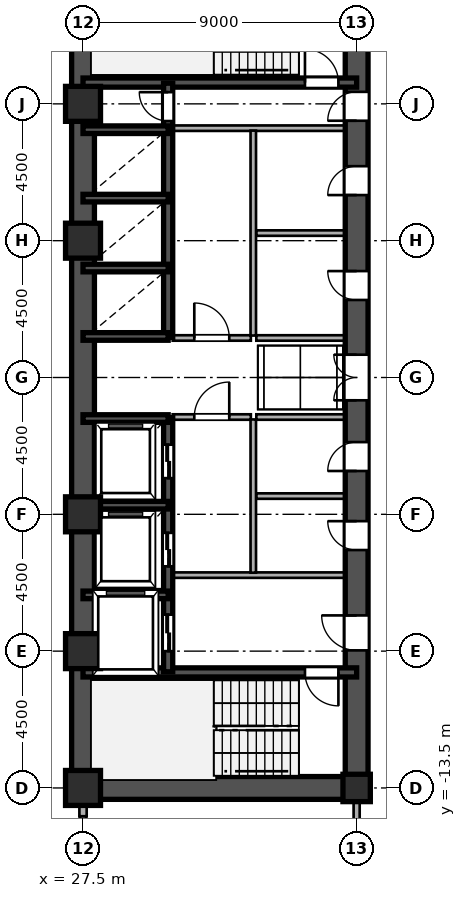
"""IFC4 building model, lengths in metres.
Left out: names, types, materials, properties, quantities, classifications, styles, units other than length and angle.
Written with IfcOpenShell. Run it as: python <this file> out.ifc"""

import sys

from ifc_helpers import new_model, si_unit, direction, frame, frame_2d, origin, origin_2d, place, context, subcontext, project, spatial, rectangle, hollow_rectangle, i_section, extrude, source, transform, mapped, element, fill, save


model = new_model("IFC4")
c1 = context("Model", 3, precision=1e-05, world=origin(), true_north=direction((0.0, 1.0)))
c2 = subcontext(c1, "Body", "Model", "MODEL_VIEW")
j1 = project(units=[si_unit("LENGTHUNIT", "METRE"), si_unit("PLANEANGLEUNIT", "RADIAN")], contexts=[c1])
p1 = place(None, origin())
s1 = spatial("IfcSite", under=j1, at=p1, CompositionType="ELEMENT")
p2 = place(p1, origin())
s2 = spatial("IfcBuilding", under=s1, at=p2, CompositionType="ELEMENT")
p3 = place(p2, frame((0.0, 0.0, 51.3)))
s3 = spatial("IfcBuildingStorey", under=s2, at=p3, CompositionType="ELEMENT", Elevation=51.3)
m1 = source(origin(), c2, "Body", "SweptSolid", [
    extrude(hollow_rectangle(XDim=1.15, YDim=1.15, WallThickness=0.048, at=origin_2d()), origin(), (0.0, 0.0, 1.0), 3.6),
])
for number, where, z_axis, x_axis in (
    (1, (27.5, -13.5, 0.0), (0.0, 0.0, 1.0), (1.0, 0.0, 0.0)),
    (2, (27.5, -9.0, 0.0), (0.0, 0.0, 1.0), (1.0, 0.0, 0.0)),
    (3, (27.5, -4.5, 0.0), (0.0, 0.0, 1.0), (1.0, 0.0, 0.0)),
    (4, (27.5, 4.5, 0.0), (0.0, 0.0, 1.0), (1.0, 0.0, 0.0)),
    (5, (27.5, 9.0, 0.0), (0.0, 0.0, 1.0), (1.0, 0.0, 0.0)),
):
    element("IfcColumn", number, at=place(p3, frame(where, z_axis=z_axis, x_axis=x_axis)), inside=s3, PredefinedType="COLUMN", context=c2, shape_type="MappedRepresentation", body=[
        mapped(m1, transform((0.0, 0.0, 0.0), scale=1.0)),
    ])
m2 = source(origin(), c2, "Body", "SweptSolid", [
    extrude(i_section(OverallWidth=0.9, OverallDepth=0.9, WebThickness=0.036, FlangeThickness=0.055, at=origin_2d()), origin(), (0.0, 0.0, 1.0), 3.6),
])
p4 = place(p3, frame((36.5, -13.5, 0.0), z_axis=(0.0, 0.0, 1.0), x_axis=(1.0, 0.0, 0.0)))
e6 = element("IfcColumn", 6, at=p4, inside=s3, PredefinedType="COLUMN", context=c2, shape_type="MappedRepresentation", body=[
    mapped(m2, transform((0.0, 0.0, 0.0), scale=1.0)),
])
p5 = place(p3, frame((27.5, -14.43, 0.0), z_axis=(0.0, 0.0, 1.0), x_axis=(0.0, 1.0, 0.0)))
e7 = element("IfcWall", 7, at=p5, inside=s3, PredefinedType="SOLIDWALL", context=c2, shape_type="SweptSolid", body=[
    extrude(rectangle(XDim=0.55, YDim=0.24, at=frame_2d((0.275, 0.0))), origin(), (0.0, 0.0, 1.0), 2.88),
])
for number, where, z_axis, x_axis in (
    (8, (27.5, -13.5, 0.0), (0.0, 0.0, 1.0), (0.0, 1.0, 0.0)),
    (9, (27.5, 1.3, 0.0), (0.0, 0.0, 1.0), (0.0, 1.0, 0.0)),
):
    element("IfcWall", number, at=place(p3, frame(where, z_axis=z_axis, x_axis=x_axis)), inside=s3, PredefinedType="SHEAR", context=c2, shape_type="SweptSolid", body=[
        extrude(rectangle(XDim=12.2, YDim=0.75, at=frame_2d((6.1, 0.0))), origin(), (0.0, 0.0, 1.0), 3.38),
    ])
p6 = place(p3, frame((27.5, -1.3, 0.0), z_axis=(0.0, 0.0, 1.0), x_axis=(0.0, 1.0, 0.0)))
e10 = element("IfcWall", 10, at=p6, inside=s3, PredefinedType="SHEAR", context=c2, shape_type="SweptSolid", body=[
    extrude(rectangle(XDim=2.6, YDim=0.75, at=frame_2d((1.3, 0.0))), origin(), (0.0, 0.0, 1.0), 3.38),
])
p7 = place(p3, frame((27.5, -13.5, 0.0), z_axis=(0.0, 0.0, 1.0), x_axis=(1.0, 0.0, 0.0)))
e11 = element("IfcWall", 11, at=p7, inside=s3, PredefinedType="SHEAR", context=c2, shape_type="SweptSolid", body=[
    extrude(rectangle(XDim=9.0, YDim=0.75, at=frame_2d((4.5, 0.0))), origin(), (0.0, 0.0, 1.0), 3.38),
])
p8 = place(p3, frame((36.5, -13.65, 0.0), z_axis=(0.0, 0.0, 1.0), x_axis=(0.0, 1.0, 0.0)))
e12 = element("IfcWall", 12, at=p8, inside=s3, PredefinedType="SHEAR", context=c2, shape_type="SweptSolid", body=[
    extrude(rectangle(XDim=7.15, YDim=0.75, at=frame_2d((3.575, 0.0))), origin(), (0.0, 0.0, 1.0), 3.38),
])
p9 = place(p8, frame((4.675, 0.0, 0.0)))
e13 = element("IfcOpeningElement", 13, at=p9, cuts=e12, PredefinedType="OPENING", context=c2, shape_type="SweptSolid", body=[
    extrude(rectangle(XDim=1.15, YDim=2.2, at=frame_2d((0.575, 1.1))), frame((0.0, 0.385, 0.0), z_axis=(0.0, -1.0, 0.0), x_axis=(1.0, 0.0, 0.0)), (0.0, 0.0, 1.0), 0.77),
])
p10 = place(p3, frame((36.5, -1.3, 0.0), z_axis=(0.0, 0.0, 1.0), x_axis=(0.0, 1.0, 0.0)))
e14 = element("IfcWall", 14, at=p10, inside=s3, PredefinedType="SHEAR", context=c2, shape_type="SweptSolid", body=[
    extrude(rectangle(XDim=2.6, YDim=0.75, at=frame_2d((1.3, 0.0))), origin(), (0.0, 0.0, 1.0), 3.38),
])
p11 = place(p10, frame((0.55, 0.0, 0.0)))
e15 = element("IfcOpeningElement", 15, at=p11, cuts=e14, PredefinedType="OPENING", context=c2, shape_type="SweptSolid", body=[
    extrude(rectangle(XDim=1.5, YDim=2.3, at=frame_2d((0.75, 1.15))), frame((0.0, 0.385, 0.0), z_axis=(0.0, -1.0, 0.0), x_axis=(1.0, 0.0, 0.0)), (0.0, 0.0, 1.0), 0.77),
])
p12 = place(p3, frame((36.5, 8.2, 0.0), z_axis=(0.0, 0.0, 1.0), x_axis=(0.0, 1.0, 0.0)))
e16 = element("IfcWall", 16, at=p12, inside=s3, PredefinedType="SHEAR", context=c2, shape_type="SweptSolid", body=[
    extrude(rectangle(XDim=5.45, YDim=0.75, at=frame_2d((2.725, 0.0))), origin(), (0.0, 0.0, 1.0), 3.38),
])
p13 = place(p12, frame((0.245, 0.0, 0.0)))
e17 = element("IfcOpeningElement", 17, at=p13, cuts=e16, PredefinedType="OPENING", context=c2, shape_type="SweptSolid", body=[
    extrude(rectangle(XDim=0.95, YDim=2.15, at=frame_2d((0.475, 1.075))), frame((0.0, 0.385, 0.0), z_axis=(0.0, -1.0, 0.0), x_axis=(1.0, 0.0, 0.0)), (0.0, 0.0, 1.0), 0.77),
])
p14 = place(p3, frame((36.5, -6.5, 0.0), z_axis=(0.0, 0.0, 1.0), x_axis=(0.0, 1.0, 0.0)))
e18 = element("IfcWall", 18, at=p14, inside=s3, PredefinedType="SHEAR", context=c2, shape_type="SweptSolid", body=[
    extrude(rectangle(XDim=2.6, YDim=0.75, at=frame_2d((1.3, 0.0))), origin(), (0.0, 0.0, 1.0), 3.38),
])
p15 = place(p14, frame((0.825, 0.0, 0.0)))
e19 = element("IfcOpeningElement", 19, at=p15, cuts=e18, PredefinedType="OPENING", context=c2, shape_type="SweptSolid", body=[
    extrude(rectangle(XDim=0.95, YDim=2.15, at=frame_2d((0.475, 1.075))), frame((0.0, 0.385, 0.0), z_axis=(0.0, -1.0, 0.0), x_axis=(1.0, 0.0, 0.0)), (0.0, 0.0, 1.0), 0.77),
])
p16 = place(p3, frame((36.5, -3.9, 0.0), z_axis=(0.0, 0.0, 1.0), x_axis=(0.0, 1.0, 0.0)))
e20 = element("IfcWall", 20, at=p16, inside=s3, PredefinedType="SHEAR", context=c2, shape_type="SweptSolid", body=[
    extrude(rectangle(XDim=2.6, YDim=0.75, at=frame_2d((1.3, 0.0))), origin(), (0.0, 0.0, 1.0), 3.38),
])
p17 = place(p16, frame((0.825, 0.0, 0.0)))
e21 = element("IfcOpeningElement", 21, at=p17, cuts=e20, PredefinedType="OPENING", context=c2, shape_type="SweptSolid", body=[
    extrude(rectangle(XDim=0.95, YDim=2.15, at=frame_2d((0.475, 1.075))), frame((0.0, 0.385, 0.0), z_axis=(0.0, -1.0, 0.0), x_axis=(1.0, 0.0, 0.0)), (0.0, 0.0, 1.0), 0.77),
])
p18 = place(p3, frame((36.5, 1.3, 0.0), z_axis=(0.0, 0.0, 1.0), x_axis=(0.0, 1.0, 0.0)))
e22 = element("IfcWall", 22, at=p18, inside=s3, PredefinedType="SHEAR", context=c2, shape_type="SweptSolid", body=[
    extrude(rectangle(XDim=3.45, YDim=0.75, at=frame_2d((1.725, 0.0))), origin(), (0.0, 0.0, 1.0), 3.38),
])
p19 = place(p18, frame((1.25, 0.0, 0.0)))
e23 = element("IfcOpeningElement", 23, at=p19, cuts=e22, PredefinedType="OPENING", context=c2, shape_type="SweptSolid", body=[
    extrude(rectangle(XDim=0.95, YDim=2.15, at=frame_2d((0.475, 1.075))), frame((0.0, 0.385, 0.0), z_axis=(0.0, -1.0, 0.0), x_axis=(1.0, 0.0, 0.0)), (0.0, 0.0, 1.0), 0.77),
])
p20 = place(p3, frame((36.5, 4.75, 0.0), z_axis=(0.0, 0.0, 1.0), x_axis=(0.0, 1.0, 0.0)))
e24 = element("IfcWall", 24, at=p20, inside=s3, PredefinedType="SHEAR", context=c2, shape_type="SweptSolid", body=[
    extrude(rectangle(XDim=3.45, YDim=0.75, at=frame_2d((1.725, 0.0))), origin(), (0.0, 0.0, 1.0), 3.38),
])
p21 = place(p20, frame((1.25, 0.0, 0.0)))
e25 = element("IfcOpeningElement", 25, at=p21, cuts=e24, PredefinedType="OPENING", context=c2, shape_type="SweptSolid", body=[
    extrude(rectangle(XDim=0.95, YDim=2.15, at=frame_2d((0.475, 1.075))), frame((0.0, 0.385, 0.0), z_axis=(0.0, -1.0, 0.0), x_axis=(1.0, 0.0, 0.0)), (0.0, 0.0, 1.0), 0.77),
])
p22 = place(p3, frame((27.5, -9.7, 0.0), z_axis=(0.0, 0.0, 1.0), x_axis=(1.0, 0.0, 0.0)))
e26 = element("IfcWall", 26, at=p22, inside=s3, PredefinedType="SHEAR", context=c2, shape_type="SweptSolid", body=[
    extrude(rectangle(XDim=9.0, YDim=0.3, at=frame_2d((4.5, 0.0))), origin(), (0.0, 0.0, 1.0), 3.38),
])
p23 = place(p22, frame((7.3, 0.0, 0.0)))
e27 = element("IfcOpeningElement", 27, at=p23, cuts=e26, PredefinedType="OPENING", context=c2, shape_type="SweptSolid", body=[
    extrude(rectangle(XDim=1.1, YDim=2.2, at=frame_2d((0.55, 1.1))), frame((0.0, 0.16, 0.0), z_axis=(0.0, -1.0, 0.0), x_axis=(1.0, 0.0, 0.0)), (0.0, 0.0, 1.0), 0.32),
])
p24 = place(p3, frame((27.5, 9.7, 0.0), z_axis=(0.0, 0.0, 1.0), x_axis=(1.0, 0.0, 0.0)))
e28 = element("IfcWall", 28, at=p24, inside=s3, PredefinedType="SHEAR", context=c2, shape_type="SweptSolid", body=[
    extrude(rectangle(XDim=9.0, YDim=0.3, at=frame_2d((4.5, 0.0))), origin(), (0.0, 0.0, 1.0), 3.38),
])
p25 = place(p24, frame((7.3, 0.0, 0.0)))
e29 = element("IfcOpeningElement", 29, at=p25, cuts=e28, PredefinedType="OPENING", context=c2, shape_type="SweptSolid", body=[
    extrude(rectangle(XDim=1.1, YDim=2.2, at=frame_2d((0.55, 1.1))), frame((0.0, 0.16, 0.0), z_axis=(0.0, -1.0, 0.0), x_axis=(1.0, 0.0, 0.0)), (0.0, 0.0, 1.0), 0.32),
])
for number, where, z_axis, x_axis in (
    (30, (27.5, -7.15, 0.0), (0.0, 0.0, 1.0), (1.0, 0.0, 0.0)),
    (31, (27.5, -4.2, 0.0), (0.0, 0.0, 1.0), (1.0, 0.0, 0.0)),
    (32, (27.5, -1.35, 0.0), (0.0, 0.0, 1.0), (1.0, 0.0, 0.0)),
    (33, (27.5, 1.35, 0.0), (0.0, 0.0, 1.0), (1.0, 0.0, 0.0)),
    (34, (27.5, 3.6, 0.0), (0.0, 0.0, 1.0), (1.0, 0.0, 0.0)),
    (35, (27.5, 5.9, 0.0), (0.0, 0.0, 1.0), (1.0, 0.0, 0.0)),
    (36, (27.5, 8.15, 0.0), (0.0, 0.0, 1.0), (1.0, 0.0, 0.0)),
):
    element("IfcWall", number, at=place(p3, frame(where, z_axis=z_axis, x_axis=x_axis)), inside=s3, PredefinedType="SHEAR", context=c2, shape_type="SweptSolid", body=[
        extrude(rectangle(XDim=2.8, YDim=0.25, at=frame_2d((1.4, 0.0))), origin(), (0.0, 0.0, 1.0), 3.38),
    ])
p26 = place(p3, frame((30.3, -9.68, 0.0), z_axis=(0.0, 0.0, 1.0), x_axis=(0.0, 1.0, 0.0)))
e37 = element("IfcWall", 37, at=p26, inside=s3, PredefinedType="SHEAR", context=c2, shape_type="SweptSolid", body=[
    extrude(rectangle(XDim=2.56, YDim=0.3, at=frame_2d((1.28, 0.0))), origin(), (0.0, 0.0, 1.0), 3.38),
])
p27 = place(p26, frame((0.68, 0.0, 0.0)))
e38 = element("IfcOpeningElement", 38, at=p27, cuts=e37, PredefinedType="OPENING", context=c2, shape_type="SweptSolid", body=[
    extrude(rectangle(XDim=1.2, YDim=2.25, at=frame_2d((0.6, 1.125))), frame((0.0, 0.16, 0.0), z_axis=(0.0, -1.0, 0.0), x_axis=(1.0, 0.0, 0.0)), (0.0, 0.0, 1.0), 0.32),
])
p28 = place(p3, frame((30.3, -7.12, 0.0), z_axis=(0.0, 0.0, 1.0), x_axis=(0.0, 1.0, 0.0)))
e39 = element("IfcWall", 39, at=p28, inside=s3, PredefinedType="SHEAR", context=c2, shape_type="SweptSolid", body=[
    extrude(rectangle(XDim=2.92, YDim=0.3, at=frame_2d((1.46, 0.0))), origin(), (0.0, 0.0, 1.0), 3.38),
])
p29 = place(p28, frame((0.91, 0.0, 0.0)))
e40 = element("IfcOpeningElement", 40, at=p29, cuts=e39, PredefinedType="OPENING", context=c2, shape_type="SweptSolid", body=[
    extrude(rectangle(XDim=1.1, YDim=2.2, at=frame_2d((0.55, 1.1))), frame((0.0, 0.16, 0.0), z_axis=(0.0, -1.0, 0.0), x_axis=(1.0, 0.0, 0.0)), (0.0, 0.0, 1.0), 0.32),
])
p30 = place(p3, frame((30.3, -4.2, 0.0), z_axis=(0.0, 0.0, 1.0), x_axis=(0.0, 1.0, 0.0)))
e41 = element("IfcWall", 41, at=p30, inside=s3, PredefinedType="SHEAR", context=c2, shape_type="SweptSolid", body=[
    extrude(rectangle(XDim=2.88, YDim=0.3, at=frame_2d((1.44, 0.0))), origin(), (0.0, 0.0, 1.0), 3.38),
])
p31 = place(p30, frame((0.89, 0.0, 0.0)))
e42 = element("IfcOpeningElement", 42, at=p31, cuts=e41, PredefinedType="OPENING", context=c2, shape_type="SweptSolid", body=[
    extrude(rectangle(XDim=1.1, YDim=2.2, at=frame_2d((0.55, 1.1))), frame((0.0, 0.16, 0.0), z_axis=(0.0, -1.0, 0.0), x_axis=(1.0, 0.0, 0.0)), (0.0, 0.0, 1.0), 0.32),
])
p32 = place(p3, frame((30.3, 1.32, 0.0), z_axis=(0.0, 0.0, 1.0), x_axis=(0.0, 1.0, 0.0)))
e43 = element("IfcWall", 43, at=p32, inside=s3, PredefinedType="SHEAR", context=c2, shape_type="SweptSolid", body=[
    extrude(rectangle(XDim=2.28, YDim=0.3, at=frame_2d((1.14, 0.0))), origin(), (0.0, 0.0, 1.0), 3.38),
])
p33 = place(p3, frame((30.3, 3.6, 0.0), z_axis=(0.0, 0.0, 1.0), x_axis=(0.0, 1.0, 0.0)))
e44 = element("IfcWall", 44, at=p33, inside=s3, PredefinedType="SHEAR", context=c2, shape_type="SweptSolid", body=[
    extrude(rectangle(XDim=2.3, YDim=0.3, at=frame_2d((1.15, 0.0))), origin(), (0.0, 0.0, 1.0), 3.38),
])
p34 = place(p3, frame((30.3, 5.9, 0.0), z_axis=(0.0, 0.0, 1.0), x_axis=(0.0, 1.0, 0.0)))
e45 = element("IfcWall", 45, at=p34, inside=s3, PredefinedType="SHEAR", context=c2, shape_type="SweptSolid", body=[
    extrude(rectangle(XDim=2.25, YDim=0.3, at=frame_2d((1.125, 0.0))), origin(), (0.0, 0.0, 1.0), 3.38),
])
p35 = place(p3, frame((30.3, 8.15, 0.0), z_axis=(0.0, 0.0, 1.0), x_axis=(0.0, 1.0, 0.0)))
e46 = element("IfcWall", 46, at=p35, inside=s3, PredefinedType="SHEAR", context=c2, shape_type="SweptSolid", body=[
    extrude(rectangle(XDim=1.53, YDim=0.3, at=frame_2d((0.765, 0.0))), origin(), (0.0, 0.0, 1.0), 3.38),
])
p36 = place(p35, frame((0.285, 0.0, 0.0)))
e47 = element("IfcOpeningElement", 47, at=p36, cuts=e46, PredefinedType="OPENING", context=c2, shape_type="SweptSolid", body=[
    extrude(rectangle(XDim=0.95, YDim=2.15, at=frame_2d((0.475, 1.075))), frame((0.0, 0.16, 0.0), z_axis=(0.0, -1.0, 0.0), x_axis=(1.0, 0.0, 0.0)), (0.0, 0.0, 1.0), 0.32),
])
for number, where, z_axis, x_axis in (
    (48, (30.45, -6.5, 0.0), (0.0, 0.0, 1.0), (1.0, 0.0, 0.0)),
    (49, (30.45, 8.2, 0.0), (0.0, 0.0, 1.0), (1.0, 0.0, 0.0)),
):
    element("IfcWall", number, at=place(p3, frame(where, z_axis=z_axis, x_axis=x_axis)), inside=s3, PredefinedType="PARTITIONING", context=c2, shape_type="SweptSolid", body=[
        extrude(rectangle(XDim=5.7, YDim=0.18, at=frame_2d((2.85, 0.0))), origin(), (0.0, 0.0, 1.0), 3.38),
    ])
p37 = place(p3, frame((33.1, -6.42, 0.0), z_axis=(0.0, 0.0, 1.0), x_axis=(0.0, 1.0, 0.0)))
e50 = element("IfcWall", 50, at=p37, inside=s3, PredefinedType="PARTITIONING", context=c2, shape_type="SweptSolid", body=[
    extrude(rectangle(XDim=5.04, YDim=0.18, at=frame_2d((2.52, 0.0))), origin(), (0.0, 0.0, 1.0), 3.38),
])
p38 = place(p3, frame((33.1, 1.38, 0.0), z_axis=(0.0, 0.0, 1.0), x_axis=(0.0, 1.0, 0.0)))
e51 = element("IfcWall", 51, at=p38, inside=s3, PredefinedType="PARTITIONING", context=c2, shape_type="SweptSolid", body=[
    extrude(rectangle(XDim=6.74, YDim=0.18, at=frame_2d((3.37, 0.0))), origin(), (0.0, 0.0, 1.0), 3.38),
])
p39 = place(p3, frame((30.45, -1.3, 0.0), z_axis=(0.0, 0.0, 1.0), x_axis=(1.0, 0.0, 0.0)))
e52 = element("IfcWall", 52, at=p39, inside=s3, PredefinedType="PARTITIONING", context=c2, shape_type="SweptSolid", body=[
    extrude(rectangle(XDim=2.57, YDim=0.18, at=frame_2d((1.285, 0.0))), origin(), (0.0, 0.0, 1.0), 3.38),
])
p40 = place(p39, frame((0.71, 0.0, 0.0)))
e53 = element("IfcOpeningElement", 53, at=p40, cuts=e52, PredefinedType="OPENING", context=c2, shape_type="SweptSolid", body=[
    extrude(rectangle(XDim=1.15, YDim=2.2, at=frame_2d((0.575, 1.1))), frame((0.0, 0.1, 0.0), z_axis=(0.0, -1.0, 0.0), x_axis=(1.0, 0.0, 0.0)), (0.0, 0.0, 1.0), 0.2),
])
p41 = place(p3, frame((30.45, 1.3, 0.0), z_axis=(0.0, 0.0, 1.0), x_axis=(1.0, 0.0, 0.0)))
e54 = element("IfcWall", 54, at=p41, inside=s3, PredefinedType="PARTITIONING", context=c2, shape_type="SweptSolid", body=[
    extrude(rectangle(XDim=2.57, YDim=0.18, at=frame_2d((1.285, 0.0))), origin(), (0.0, 0.0, 1.0), 3.38),
])
p42 = place(p41, frame((0.71, 0.0, 0.0)))
e55 = element("IfcOpeningElement", 55, at=p42, cuts=e54, PredefinedType="OPENING", context=c2, shape_type="SweptSolid", body=[
    extrude(rectangle(XDim=1.15, YDim=2.2, at=frame_2d((0.575, 1.1))), frame((0.0, 0.1, 0.0), z_axis=(0.0, -1.0, 0.0), x_axis=(1.0, 0.0, 0.0)), (0.0, 0.0, 1.0), 0.2),
])
for number, where, z_axis, x_axis in (
    (56, (33.2, -1.3, 0.0), (0.0, 0.0, 1.0), (1.0, 0.0, 0.0)),
    (57, (33.2, 1.3, 0.0), (0.0, 0.0, 1.0), (1.0, 0.0, 0.0)),
    (58, (33.2, -3.9, 0.0), (0.0, 0.0, 1.0), (1.0, 0.0, 0.0)),
    (59, (33.2, 4.75, 0.0), (0.0, 0.0, 1.0), (1.0, 0.0, 0.0)),
):
    element("IfcWall", number, at=place(p3, frame(where, z_axis=z_axis, x_axis=x_axis)), inside=s3, PredefinedType="PARTITIONING", context=c2, shape_type="SweptSolid", body=[
        extrude(rectangle(XDim=2.95, YDim=0.18, at=frame_2d((1.475, 0.0))), origin(), (0.0, 0.0, 1.0), 3.38),
    ])
p43 = place(p3, frame((36.5, -15.515, 0.0), z_axis=(0.0, 0.0, 1.0), x_axis=(0.0, 1.0, 0.0)))
e60 = element("IfcWall", 60, at=p43, inside=s3, PredefinedType="PARTITIONING", context=c2, shape_type="SweptSolid", body=[
    extrude(rectangle(XDim=1.635, YDim=0.2, at=frame_2d((0.817, 0.0))), origin(), (0.0, 0.0, 1.0), 2.68),
])
m3 = source(origin(), c2, "Body", "SweptSolid", [
    extrude(rectangle(XDim=1.15, YDim=2.2, at=frame_2d((0.575, 1.1))), frame((0.0, 0.025, 0.0), z_axis=(0.0, -1.0, 0.0), x_axis=(1.0, 0.0, 0.0)), (0.0, 0.0, 1.0), 0.05),
])
p44 = place(p9, origin())
e61 = element("IfcDoor", 61, at=p44, inside=s3, OperationType="SINGLE_SWING_RIGHT", PredefinedType="DOOR", context=c2, shape_type="MappedRepresentation", body=[
    mapped(m3, transform((0.0, 0.0, 0.0), scale=1.0)),
])
fill(e13, e61)
m4 = source(origin(), c2, "Body", "SweptSolid", [
    extrude(rectangle(XDim=1.5, YDim=2.3, at=frame_2d((0.75, 1.15))), frame((0.0, 0.025, 0.0), z_axis=(0.0, -1.0, 0.0), x_axis=(1.0, 0.0, 0.0)), (0.0, 0.0, 1.0), 0.05),
])
p45 = place(p11, origin())
e62 = element("IfcDoor", 62, at=p45, inside=s3, OperationType="DOUBLE_SWING_LEFT", PredefinedType="DOOR", context=c2, shape_type="MappedRepresentation", body=[
    mapped(m4, transform((0.0, 0.0, 0.0), scale=1.0)),
])
fill(e15, e62)
m5 = source(origin(), c2, "Body", "SweptSolid", [
    extrude(rectangle(XDim=0.95, YDim=2.15, at=frame_2d((0.475, 1.075))), frame((0.0, 0.025, 0.0), z_axis=(0.0, -1.0, 0.0), x_axis=(1.0, 0.0, 0.0)), (0.0, 0.0, 1.0), 0.05),
])
p46 = place(p13, origin())
e63 = element("IfcDoor", 63, at=p46, inside=s3, OperationType="SINGLE_SWING_LEFT", PredefinedType="DOOR", context=c2, shape_type="MappedRepresentation", body=[
    mapped(m5, transform((0.0, 0.0, 0.0), scale=1.0)),
])
fill(e17, e63)
p47 = place(p15, origin())
e64 = element("IfcDoor", 64, at=p47, inside=s3, OperationType="SINGLE_SWING_RIGHT", PredefinedType="DOOR", context=c2, shape_type="MappedRepresentation", body=[
    mapped(m5, transform((0.0, 0.0, 0.0), scale=1.0)),
])
fill(e19, e64)
p48 = place(p17, origin())
e65 = element("IfcDoor", 65, at=p48, inside=s3, OperationType="SINGLE_SWING_LEFT", PredefinedType="DOOR", context=c2, shape_type="MappedRepresentation", body=[
    mapped(m5, transform((0.0, 0.0, 0.0), scale=1.0)),
])
fill(e21, e65)
p49 = place(p19, origin())
e66 = element("IfcDoor", 66, at=p49, inside=s3, OperationType="SINGLE_SWING_RIGHT", PredefinedType="DOOR", context=c2, shape_type="MappedRepresentation", body=[
    mapped(m5, transform((0.0, 0.0, 0.0), scale=1.0)),
])
fill(e23, e66)
p50 = place(p21, origin())
e67 = element("IfcDoor", 67, at=p50, inside=s3, OperationType="SINGLE_SWING_LEFT", PredefinedType="DOOR", context=c2, shape_type="MappedRepresentation", body=[
    mapped(m5, transform((0.0, 0.0, 0.0), scale=1.0)),
])
fill(e25, e67)
m6 = source(origin(), c2, "Body", "SweptSolid", [
    extrude(rectangle(XDim=1.1, YDim=2.2, at=frame_2d((0.55, 1.1))), frame((0.0, 0.025, 0.0), z_axis=(0.0, -1.0, 0.0), x_axis=(1.0, 0.0, 0.0)), (0.0, 0.0, 1.0), 0.05),
])
p51 = place(p23, frame((1.1, 0.0, 0.0), z_axis=(0.0, 0.0, 1.0), x_axis=(-1.0, 0.0, 0.0)))
e68 = element("IfcDoor", 68, at=p51, inside=s3, OperationType="SINGLE_SWING_RIGHT", PredefinedType="DOOR", context=c2, shape_type="MappedRepresentation", body=[
    mapped(m6, transform((0.0, 0.0, 0.0), scale=1.0)),
])
fill(e27, e68)
p52 = place(p25, origin())
e69 = element("IfcDoor", 69, at=p52, inside=s3, OperationType="SINGLE_SWING_LEFT", PredefinedType="DOOR", context=c2, shape_type="MappedRepresentation", body=[
    mapped(m6, transform((0.0, 0.0, 0.0), scale=1.0)),
])
fill(e29, e69)
m7 = source(origin(), c2, "Body", "SweptSolid", [
    extrude(rectangle(XDim=1.2, YDim=2.25, at=frame_2d((0.6, 1.125))), frame((0.0, 0.025, 0.0), z_axis=(0.0, -1.0, 0.0), x_axis=(1.0, 0.0, 0.0)), (0.0, 0.0, 1.0), 0.05),
])
p53 = place(p27, origin())
e70 = element("IfcDoor", 70, at=p53, inside=s3, OperationType="DOUBLE_DOOR_SLIDING", PredefinedType="DOOR", context=c2, shape_type="MappedRepresentation", body=[
    mapped(m7, transform((0.0, 0.0, 0.0), scale=1.0)),
])
fill(e38, e70)
m8 = source(origin(), c2, "Body", "SweptSolid", [
    extrude(rectangle(XDim=1.1, YDim=2.2, at=frame_2d((0.55, 1.1))), frame((0.0, 0.025, 0.0), z_axis=(0.0, -1.0, 0.0), x_axis=(1.0, 0.0, 0.0)), (0.0, 0.0, 1.0), 0.05),
])
p54 = place(p29, origin())
e71 = element("IfcDoor", 71, at=p54, inside=s3, OperationType="DOUBLE_DOOR_SLIDING", PredefinedType="DOOR", context=c2, shape_type="MappedRepresentation", body=[
    mapped(m8, transform((0.0, 0.0, 0.0), scale=1.0)),
])
fill(e40, e71)
p55 = place(p31, origin())
e72 = element("IfcDoor", 72, at=p55, inside=s3, OperationType="DOUBLE_DOOR_SLIDING", PredefinedType="DOOR", context=c2, shape_type="MappedRepresentation", body=[
    mapped(m8, transform((0.0, 0.0, 0.0), scale=1.0)),
])
fill(e42, e72)
p56 = place(p36, origin())
e73 = element("IfcDoor", 73, at=p56, inside=s3, OperationType="SINGLE_SWING_RIGHT", PredefinedType="DOOR", context=c2, shape_type="MappedRepresentation", body=[
    mapped(m5, transform((0.0, 0.0, 0.0), scale=1.0)),
])
fill(e47, e73)
p57 = place(p40, origin())
e74 = element("IfcDoor", 74, at=p57, inside=s3, OperationType="SINGLE_SWING_RIGHT", PredefinedType="DOOR", context=c2, shape_type="MappedRepresentation", body=[
    mapped(m3, transform((0.0, 0.0, 0.0), scale=1.0)),
])
fill(e53, e74)
p58 = place(p42, origin())
e75 = element("IfcDoor", 75, at=p58, inside=s3, OperationType="SINGLE_SWING_LEFT", PredefinedType="DOOR", context=c2, shape_type="MappedRepresentation", body=[
    mapped(m3, transform((0.0, 0.0, 0.0), scale=1.0)),
])
fill(e55, e75)
save(model, sys.argv[1])
